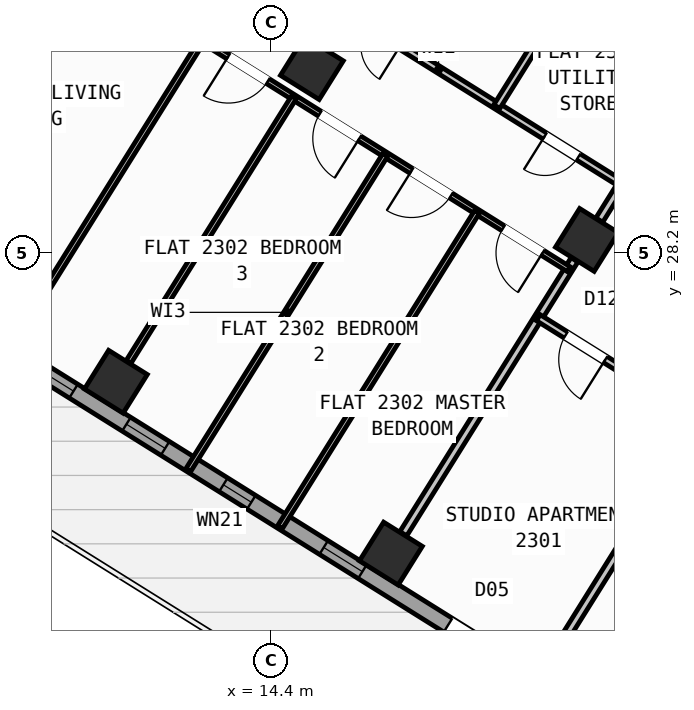
"""IFC4 building model, lengths in metres.
Left out: names, types, materials, properties, quantities, classifications, styles, units other than length and angle.
Written with IfcOpenShell. Run it as: python <this file> out.ifc"""

import sys

from ifc_helpers import new_model, si_unit, direction, frame, frame_2d, origin, origin_2d, place, context, subcontext, project, spatial, rectangle, hollow_rectangle, extrude, source, transform, mapped, element, fill, save


model = new_model("IFC4")
c1 = context("Model", 3, precision=1e-05, world=origin(), true_north=direction((0.0, 1.0)))
c2 = subcontext(c1, "Body", "Model", "MODEL_VIEW")
j1 = project(units=[si_unit("LENGTHUNIT", "METRE"), si_unit("PLANEANGLEUNIT", "RADIAN")], contexts=[c1])
p1 = place(None, origin())
s1 = spatial("IfcSite", under=j1, at=p1, CompositionType="ELEMENT")
p2 = place(p1, origin())
s2 = spatial("IfcBuilding", under=s1, at=p2, CompositionType="ELEMENT")
p3 = place(p2, frame((0.0, 0.0, 93.6)))
s3 = spatial("IfcBuildingStorey", under=s2, at=p3, CompositionType="ELEMENT", Elevation=93.6)
m1 = source(origin(), c2, "Body", "SweptSolid", [
    extrude(hollow_rectangle(XDim=0.9, YDim=0.9, WallThickness=0.036, at=origin_2d()), origin(), (0.0, 0.0, 1.0), 3.6),
])
for number, where, z_axis, x_axis in (
    (1, (20.632, 28.452, 0.0), (0.0, 0.0, 1.0), (-0.848, 0.53, 0.0)),
    (2, (16.764, 22.261, 0.0), (0.0, 0.0, 1.0), (-0.848, 0.53, 0.0)),
    (3, (15.205, 31.844, 0.0), (0.0, 0.0, 1.0), (-0.848, 0.53, 0.0)),
    (4, (11.336, 25.653, 0.0), (0.0, 0.0, 1.0), (-0.848, 0.53, 0.0)),
):
    element("IfcColumn", number, at=place(p3, frame(where, z_axis=z_axis, x_axis=x_axis)), inside=s3, PredefinedType="COLUMN", context=c2, shape_type="MappedRepresentation", body=[
        mapped(m1, transform((0.0, 0.0, 0.0), scale=1.0)),
    ])
p4 = place(p3, frame((31.76, 12.183, 0.0), z_axis=(0.0, 0.0, 1.0), x_axis=(-0.848047074256, 0.529920899612, 0.0)))
e5 = element("IfcWall", 5, at=p4, inside=s3, PredefinedType="STANDARD", context=c2, shape_type="SweptSolid", body=[
    extrude(rectangle(XDim=30.652, YDim=0.32, at=frame_2d((15.326, 0.0))), origin(), (0.0, 0.0, 1.0), 3.35),
])
p5 = place(p4, frame((15.153, 0.0, 0.0)))
e6 = element("IfcOpeningElement", 6, at=p5, cuts=e5, PredefinedType="OPENING", context=c2, shape_type="SweptSolid", body=[
    extrude(rectangle(XDim=1.2, YDim=2.15, at=frame_2d((0.6, 1.075))), frame((0.0, 0.17, 0.0), z_axis=(0.0, -1.0, 0.0), x_axis=(1.0, 0.0, 0.0)), (0.0, 0.0, 1.0), 0.34),
])
p6 = place(p4, frame((2.002, 0.0, 0.8)))
e7 = element("IfcOpeningElement", 7, at=p6, cuts=e5, PredefinedType="OPENING", context=c2, shape_type="SweptSolid", body=[
    extrude(rectangle(XDim=2.1, YDim=1.55, at=frame_2d((1.05, 0.775))), frame((0.0, 0.17, 0.0), z_axis=(0.0, -1.0, 0.0), x_axis=(1.0, 0.0, 0.0)), (0.0, 0.0, 1.0), 0.34),
])
p7 = place(p4, frame((7.206, 0.0, 0.8)))
e8 = element("IfcOpeningElement", 8, at=p7, cuts=e5, PredefinedType="OPENING", context=c2, shape_type="SweptSolid", body=[
    extrude(rectangle(XDim=2.1, YDim=1.55, at=frame_2d((1.05, 0.775))), frame((0.0, 0.17, 0.0), z_axis=(0.0, -1.0, 0.0), x_axis=(1.0, 0.0, 0.0)), (0.0, 0.0, 1.0), 0.34),
])
p8 = place(p4, frame((12.648, 0.0, 1.0)))
e9 = element("IfcOpeningElement", 9, at=p8, cuts=e5, PredefinedType="OPENING", context=c2, shape_type="SweptSolid", body=[
    extrude(rectangle(XDim=0.9, YDim=1.25, at=frame_2d((0.45, 0.625))), frame((0.0, 0.17, 0.0), z_axis=(0.0, -1.0, 0.0), x_axis=(1.0, 0.0, 0.0)), (0.0, 0.0, 1.0), 0.34),
])
p9 = place(p4, frame((27.974, 0.0, 0.95)))
e10 = element("IfcOpeningElement", 10, at=p9, cuts=e5, PredefinedType="OPENING", context=c2, shape_type="SweptSolid", body=[
    extrude(rectangle(XDim=1.2, YDim=1.4, at=frame_2d((0.6, 0.7))), frame((0.0, 0.17, 0.0), z_axis=(0.0, -1.0, 0.0), x_axis=(1.0, 0.0, 0.0)), (0.0, 0.0, 1.0), 0.34),
])
p10 = place(p4, frame((18.347, 0.0, 1.0)))
e11 = element("IfcOpeningElement", 11, at=p10, cuts=e5, PredefinedType="OPENING", context=c2, shape_type="SweptSolid", body=[
    extrude(rectangle(XDim=0.9, YDim=1.25, at=frame_2d((0.45, 0.625))), frame((0.0, 0.17, 0.0), z_axis=(0.0, -1.0, 0.0), x_axis=(1.0, 0.0, 0.0)), (0.0, 0.0, 1.0), 0.34),
])
p11 = place(p4, frame((20.931, 0.0, 1.0)))
e12 = element("IfcOpeningElement", 12, at=p11, cuts=e5, PredefinedType="OPENING", context=c2, shape_type="SweptSolid", body=[
    extrude(rectangle(XDim=0.65, YDim=1.15, at=frame_2d((0.325, 0.575))), frame((0.0, 0.17, 0.0), z_axis=(0.0, -1.0, 0.0), x_axis=(1.0, 0.0, 0.0)), (0.0, 0.0, 1.0), 0.34),
])
p12 = place(p4, frame((22.938, 0.0, 1.0)))
e13 = element("IfcOpeningElement", 13, at=p12, cuts=e5, PredefinedType="OPENING", context=c2, shape_type="SweptSolid", body=[
    extrude(rectangle(XDim=0.9, YDim=1.25, at=frame_2d((0.45, 0.625))), frame((0.0, 0.17, 0.0), z_axis=(0.0, -1.0, 0.0), x_axis=(1.0, 0.0, 0.0)), (0.0, 0.0, 1.0), 0.34),
])
p13 = place(p4, frame((25.069, 0.0, 1.0)))
e14 = element("IfcOpeningElement", 14, at=p13, cuts=e5, PredefinedType="OPENING", context=c2, shape_type="SweptSolid", body=[
    extrude(rectangle(XDim=0.9, YDim=1.25, at=frame_2d((0.45, 0.625))), frame((0.0, 0.17, 0.0), z_axis=(0.0, -1.0, 0.0), x_axis=(1.0, 0.0, 0.0)), (0.0, 0.0, 1.0), 0.34),
])
p14 = place(p3, frame((5.7, 28.71, 0.0), z_axis=(0.0, 0.0, 1.0), x_axis=(0.529923711467, 0.8480453172, 0.0)))
e15 = element("IfcWall", 15, at=p14, inside=s3, PredefinedType="STANDARD", context=c2, shape_type="SweptSolid", body=[
    extrude(rectangle(XDim=21.587, YDim=0.32, at=frame_2d((10.794, 0.0))), origin(), (0.0, 0.0, 1.0), 2.775),
])
p15 = place(p14, frame((2.994, 0.0, 0.8)))
e16 = element("IfcOpeningElement", 16, at=p15, cuts=e15, PredefinedType="OPENING", context=c2, shape_type="SweptSolid", body=[
    extrude(rectangle(XDim=2.1, YDim=1.55, at=frame_2d((1.05, 0.775))), frame((0.0, 0.17, 0.0), z_axis=(0.0, -1.0, 0.0), x_axis=(1.0, 0.0, 0.0)), (0.0, 0.0, 1.0), 0.34),
])
p16 = place(p14, frame((9.739, 0.0, 1.0)))
e17 = element("IfcOpeningElement", 17, at=p16, cuts=e15, PredefinedType="OPENING", context=c2, shape_type="SweptSolid", body=[
    extrude(rectangle(XDim=0.9, YDim=1.25, at=frame_2d((0.45, 0.625))), frame((0.0, 0.17, 0.0), z_axis=(0.0, -1.0, 0.0), x_axis=(1.0, 0.0, 0.0)), (0.0, 0.0, 1.0), 0.34),
])
p17 = place(p14, frame((18.639, 0.0, 0.85)))
e18 = element("IfcOpeningElement", 18, at=p17, cuts=e15, PredefinedType="OPENING", context=c2, shape_type="SweptSolid", body=[
    extrude(rectangle(XDim=1.5, YDim=1.5, at=frame_2d((0.75, 0.75))), frame((0.0, 0.17, 0.0), z_axis=(0.0, -1.0, 0.0), x_axis=(1.0, 0.0, 0.0)), (0.0, 0.0, 1.0), 0.34),
])
p18 = place(p3, frame((17.424, 47.083, 0.0), z_axis=(0.0, 0.0, 1.0), x_axis=(0.848049927979, -0.529916332693, 0.0)))
e19 = element("IfcWall", 19, at=p18, inside=s3, PredefinedType="STANDARD", context=c2, shape_type="SweptSolid", body=[
    extrude(rectangle(XDim=29.223, YDim=0.32, at=frame_2d((14.612, 0.0))), origin(), (0.0, 0.0, 1.0), 3.35),
])
p19 = place(p18, frame((3.745, 0.0, 0.0)))
e20 = element("IfcOpeningElement", 20, at=p19, cuts=e19, PredefinedType="OPENING", context=c2, shape_type="SweptSolid", body=[
    extrude(rectangle(XDim=1.05, YDim=2.15, at=frame_2d((0.525, 1.075))), frame((0.0, 0.17, 0.0), z_axis=(0.0, -1.0, 0.0), x_axis=(1.0, 0.0, 0.0)), (0.0, 0.0, 1.0), 0.34),
])
p20 = place(p18, frame((0.699, 0.0, 0.95)))
e21 = element("IfcOpeningElement", 21, at=p20, cuts=e19, PredefinedType="OPENING", context=c2, shape_type="SweptSolid", body=[
    extrude(rectangle(XDim=1.2, YDim=1.4, at=frame_2d((0.6, 0.7))), frame((0.0, 0.17, 0.0), z_axis=(0.0, -1.0, 0.0), x_axis=(1.0, 0.0, 0.0)), (0.0, 0.0, 1.0), 0.34),
])
p21 = place(p18, frame((6.951, 0.0, 1.0)))
e22 = element("IfcOpeningElement", 22, at=p21, cuts=e19, PredefinedType="OPENING", context=c2, shape_type="SweptSolid", body=[
    extrude(rectangle(XDim=0.9, YDim=1.25, at=frame_2d((0.45, 0.625))), frame((0.0, 0.17, 0.0), z_axis=(0.0, -1.0, 0.0), x_axis=(1.0, 0.0, 0.0)), (0.0, 0.0, 1.0), 0.34),
])
p22 = place(p18, frame((9.841, 0.0, 0.85)))
e23 = element("IfcOpeningElement", 23, at=p22, cuts=e19, PredefinedType="OPENING", context=c2, shape_type="SweptSolid", body=[
    extrude(rectangle(XDim=1.5, YDim=1.5, at=frame_2d((0.75, 0.75))), frame((0.0, 0.17, 0.0), z_axis=(0.0, -1.0, 0.0), x_axis=(1.0, 0.0, 0.0)), (0.0, 0.0, 1.0), 0.34),
])
p23 = place(p18, frame((13.889, 0.0, 0.95)))
e24 = element("IfcOpeningElement", 24, at=p23, cuts=e19, PredefinedType="OPENING", context=c2, shape_type="SweptSolid", body=[
    extrude(rectangle(XDim=1.2, YDim=1.4, at=frame_2d((0.6, 0.7))), frame((0.0, 0.17, 0.0), z_axis=(0.0, -1.0, 0.0), x_axis=(1.0, 0.0, 0.0)), (0.0, 0.0, 1.0), 0.34),
])
p24 = place(p18, frame((17.254, 0.0, 1.0)))
e25 = element("IfcOpeningElement", 25, at=p24, cuts=e19, PredefinedType="OPENING", context=c2, shape_type="SweptSolid", body=[
    extrude(rectangle(XDim=0.9, YDim=1.25, at=frame_2d((0.45, 0.625))), frame((0.0, 0.17, 0.0), z_axis=(0.0, -1.0, 0.0), x_axis=(1.0, 0.0, 0.0)), (0.0, 0.0, 1.0), 0.34),
])
p25 = place(p18, frame((20.764, 0.0, 0.8)))
e26 = element("IfcOpeningElement", 26, at=p25, cuts=e19, PredefinedType="OPENING", context=c2, shape_type="SweptSolid", body=[
    extrude(rectangle(XDim=2.1, YDim=1.55, at=frame_2d((1.05, 0.775))), frame((0.0, 0.17, 0.0), z_axis=(0.0, -1.0, 0.0), x_axis=(1.0, 0.0, 0.0)), (0.0, 0.0, 1.0), 0.34),
])
p26 = place(p18, frame((25.403, 0.0, 0.8)))
e27 = element("IfcOpeningElement", 27, at=p26, cuts=e19, PredefinedType="OPENING", context=c2, shape_type="SweptSolid", body=[
    extrude(rectangle(XDim=2.1, YDim=1.55, at=frame_2d((1.05, 0.775))), frame((0.0, 0.17, 0.0), z_axis=(0.0, -1.0, 0.0), x_axis=(1.0, 0.0, 0.0)), (0.0, 0.0, 1.0), 0.34),
])
p27 = place(p3, frame((25.807, 29.582, 0.0), z_axis=(0.0, 0.0, 1.0), x_axis=(-0.529920357077, -0.848047413271, 0.0)))
e28 = element("IfcWall", 28, at=p27, inside=s3, PredefinedType="PARTITIONING", context=c2, shape_type="SweptSolid", body=[
    extrude(rectangle(XDim=11.45, YDim=0.16, at=frame_2d((5.725, 0.0))), origin(), (0.0, 0.0, 1.0), 3.34),
])
p28 = place(p3, frame((26.973, 31.447, 0.0), z_axis=(0.0, 0.0, 1.0), x_axis=(-0.848048310262, 0.529918921593, 0.0)))
e29 = element("IfcWall", 29, at=p28, inside=s3, PredefinedType="PARTITIONING", context=c2, shape_type="SweptSolid", body=[
    extrude(rectangle(XDim=16.73, YDim=0.16, at=frame_2d((8.365, 0.0))), origin(), (0.0, 0.0, 1.0), 3.34),
])
p29 = place(p28, frame((2.22, 0.0, 0.0)))
e30 = element("IfcOpeningElement", 30, at=p29, cuts=e29, PredefinedType="OPENING", context=c2, shape_type="SweptSolid", body=[
    extrude(rectangle(XDim=0.86, YDim=2.05, at=frame_2d((0.43, 1.025))), frame((0.0, 0.09, 0.0), z_axis=(0.0, -1.0, 0.0), x_axis=(1.0, 0.0, 0.0)), (0.0, 0.0, 1.0), 0.18),
])
p30 = place(p28, frame((5.28, 0.0, 0.0)))
e31 = element("IfcOpeningElement", 31, at=p30, cuts=e29, PredefinedType="OPENING", context=c2, shape_type="SweptSolid", body=[
    extrude(rectangle(XDim=1.0, YDim=2.1, at=frame_2d((0.5, 1.05))), frame((0.0, 0.09, 0.0), z_axis=(0.0, -1.0, 0.0), x_axis=(1.0, 0.0, 0.0)), (0.0, 0.0, 1.0), 0.18),
])
p31 = place(p3, frame((25.807, 29.582, 0.0), z_axis=(0.0, 0.0, 1.0), x_axis=(-0.848052408131, 0.529912363569, 0.0)))
e32 = element("IfcWall", 32, at=p31, inside=s3, PredefinedType="PARTITIONING", context=c2, shape_type="SweptSolid", body=[
    extrude(rectangle(XDim=16.73, YDim=0.16, at=frame_2d((8.365, 0.0))), origin(), (0.0, 0.0, 1.0), 3.34),
])
p32 = place(p31, frame((2.22, 0.0, 0.0)))
e33 = element("IfcOpeningElement", 33, at=p32, cuts=e32, PredefinedType="OPENING", context=c2, shape_type="SweptSolid", body=[
    extrude(rectangle(XDim=0.86, YDim=2.05, at=frame_2d((0.43, 1.025))), frame((0.0, 0.09, 0.0), z_axis=(0.0, -1.0, 0.0), x_axis=(1.0, 0.0, 0.0)), (0.0, 0.0, 1.0), 0.18),
])
p33 = place(p31, frame((14.013, 0.0, 0.0)))
e34 = element("IfcOpeningElement", 34, at=p33, cuts=e32, PredefinedType="OPENING", context=c2, shape_type="SweptSolid", body=[
    extrude(rectangle(XDim=1.0, YDim=2.1, at=frame_2d((0.5, 1.05))), frame((0.0, 0.09, 0.0), z_axis=(0.0, -1.0, 0.0), x_axis=(1.0, 0.0, 0.0)), (0.0, 0.0, 1.0), 0.18),
])
p34 = place(p3, frame((22.593, 31.59, 0.0), z_axis=(0.0, 0.0, 1.0), x_axis=(-0.529924383291, -0.848044897393, 0.0)))
e35 = element("IfcWall", 35, at=p34, inside=s3, PredefinedType="PARTITIONING", context=c2, shape_type="SweptSolid", body=[
    extrude(rectangle(XDim=3.238, YDim=0.16, at=frame_2d((1.619, 0.0))), origin(), (0.0, 0.0, 1.0), 2.775),
])
p35 = place(p3, frame((20.387, 28.06, 0.0), z_axis=(0.0, 0.0, 1.0), x_axis=(-0.529902564924, -0.848058530814, 0.0)))
e36 = element("IfcWall", 36, at=p35, inside=s3, PredefinedType="PARTITIONING", context=c2, shape_type="SweptSolid", body=[
    extrude(rectangle(XDim=6.376, YDim=0.16, at=frame_2d((3.188, 0.0))), origin(), (0.0, 0.0, 1.0), 2.775),
])
p36 = place(p3, frame((22.887, 24.909, 0.0), z_axis=(0.0, 0.0, 1.0), x_axis=(-0.84803087207, 0.529946827537, 0.0)))
e37 = element("IfcWall", 37, at=p36, inside=s3, PredefinedType="PLUMBINGWALL", context=c2, shape_type="SweptSolid", body=[
    extrude(rectangle(XDim=3.79, YDim=0.14, at=frame_2d((1.895, 0.0))), origin(), (0.0, 0.0, 1.0), 3.34),
])
p37 = place(p36, frame((2.23, 0.0, 0.0)))
e38 = element("IfcOpeningElement", 38, at=p37, cuts=e37, PredefinedType="OPENING", context=c2, shape_type="SweptSolid", body=[
    extrude(rectangle(XDim=0.92, YDim=2.08, at=frame_2d((0.46, 1.04))), frame((0.0, 0.08, 0.0), z_axis=(0.0, -1.0, 0.0), x_axis=(1.0, 0.0, 0.0)), (0.0, 0.0, 1.0), 0.16),
])
p38 = place(p3, frame((15.361, 36.108, 0.0), z_axis=(0.0, 0.0, 1.0), x_axis=(-0.529912802348, -0.848052133956, 0.0)))
e39 = element("IfcWall", 39, at=p38, inside=s3, PredefinedType="PARTITIONING", context=c2, shape_type="SweptSolid", body=[
    extrude(rectangle(XDim=11.72, YDim=0.11, at=frame_2d((5.86, 0.0))), origin(), (0.0, 0.0, 1.0), 2.995),
])
p39 = place(p38, frame((3.0, 0.0, 0.0)))
e40 = element("IfcOpeningElement", 40, at=p39, cuts=e39, PredefinedType="OPENING", context=c2, shape_type="SweptSolid", body=[
    extrude(rectangle(XDim=0.78, YDim=2.05, at=frame_2d((0.39, 1.025))), frame((0.0, 0.065, 0.0), z_axis=(0.0, -1.0, 0.0), x_axis=(1.0, 0.0, 0.0)), (0.0, 0.0, 1.0), 0.13),
])
p40 = place(p3, frame((21.321, 29.554, 0.0), z_axis=(0.0, 0.0, 1.0), x_axis=(-0.84803529765, 0.529939745575, 0.0)))
e41 = element("IfcWall", 41, at=p40, inside=s3, PredefinedType="PLUMBINGWALL", context=c2, shape_type="SweptSolid", body=[
    extrude(rectangle(XDim=8.527, YDim=0.14, at=frame_2d((4.264, 0.0))), origin(), (0.0, 0.0, 1.0), 3.34),
])
p41 = place(p40, frame((5.155, 0.0, 0.0)))
e42 = element("IfcOpeningElement", 42, at=p41, cuts=e41, PredefinedType="OPENING", context=c2, shape_type="SweptSolid", body=[
    extrude(rectangle(XDim=0.78, YDim=2.05, at=frame_2d((0.39, 1.025))), frame((0.0, 0.08, 0.0), z_axis=(0.0, -1.0, 0.0), x_axis=(1.0, 0.0, 0.0)), (0.0, 0.0, 1.0), 0.16),
])
p42 = place(p40, frame((1.011, 0.0, 0.0)))
e43 = element("IfcOpeningElement", 43, at=p42, cuts=e41, PredefinedType="OPENING", context=c2, shape_type="SweptSolid", body=[
    extrude(rectangle(XDim=0.78, YDim=2.05, at=frame_2d((0.39, 1.025))), frame((0.0, 0.08, 0.0), z_axis=(0.0, -1.0, 0.0), x_axis=(1.0, 0.0, 0.0)), (0.0, 0.0, 1.0), 0.16),
])
p43 = place(p3, frame((20.132, 33.128, 0.0), z_axis=(0.0, 0.0, 1.0), x_axis=(-0.529935194983, -0.848038141311, 0.0)))
e44 = element("IfcWall", 44, at=p43, inside=s3, PredefinedType="PLUMBINGWALL", context=c2, shape_type="SweptSolid", body=[
    extrude(rectangle(XDim=2.41, YDim=0.14, at=frame_2d((1.205, 0.0))), origin(), (0.0, 0.0, 1.0), 3.34),
])
p44 = place(p3, frame((20.272, 27.875, 0.0), z_axis=(0.0, 0.0, 1.0), x_axis=(-0.848056204746, 0.529906287557, 0.0)))
e45 = element("IfcWall", 45, at=p44, inside=s3, PredefinedType="PARTITIONING", context=c2, shape_type="SweptSolid", body=[
    extrude(rectangle(XDim=8.527, YDim=0.11, at=frame_2d((4.264, 0.0))), origin(), (0.0, 0.0, 1.0), 3.34),
])
p45 = place(p44, frame((0.606, 0.0, 0.0)))
e46 = element("IfcOpeningElement", 46, at=p45, cuts=e45, PredefinedType="OPENING", context=c2, shape_type="SweptSolid", body=[
    extrude(rectangle(XDim=0.92, YDim=2.08, at=frame_2d((0.46, 1.04))), frame((0.0, 0.065, 0.0), z_axis=(0.0, -1.0, 0.0), x_axis=(1.0, 0.0, 0.0)), (0.0, 0.0, 1.0), 0.13),
])
p46 = place(p44, frame((2.738, 0.0, 0.0)))
e47 = element("IfcOpeningElement", 47, at=p46, cuts=e45, PredefinedType="OPENING", context=c2, shape_type="SweptSolid", body=[
    extrude(rectangle(XDim=0.92, YDim=2.08, at=frame_2d((0.46, 1.04))), frame((0.0, 0.065, 0.0), z_axis=(0.0, -1.0, 0.0), x_axis=(1.0, 0.0, 0.0)), (0.0, 0.0, 1.0), 0.13),
])
p47 = place(p44, frame((4.869, 0.0, 0.0)))
e48 = element("IfcOpeningElement", 48, at=p47, cuts=e45, PredefinedType="OPENING", context=c2, shape_type="SweptSolid", body=[
    extrude(rectangle(XDim=0.92, YDim=2.08, at=frame_2d((0.46, 1.04))), frame((0.0, 0.065, 0.0), z_axis=(0.0, -1.0, 0.0), x_axis=(1.0, 0.0, 0.0)), (0.0, 0.0, 1.0), 0.13),
])
p48 = place(p44, frame((7.001, 0.0, 0.0)))
e49 = element("IfcOpeningElement", 49, at=p48, cuts=e45, PredefinedType="OPENING", context=c2, shape_type="SweptSolid", body=[
    extrude(rectangle(XDim=0.92, YDim=2.08, at=frame_2d((0.46, 1.04))), frame((0.0, 0.065, 0.0), z_axis=(0.0, -1.0, 0.0), x_axis=(1.0, 0.0, 0.0)), (0.0, 0.0, 1.0), 0.13),
])
for number, where, z_axis, x_axis in (
    (50, (18.464, 29.005, 0.0), (0.0, 0.0, 1.0), (-0.53, -0.848, 0.0)),
    (51, (16.656, 30.135, 0.0), (0.0, 0.0, 1.0), (-0.53, -0.848, 0.0)),
):
    element("IfcWall", number, at=place(p3, frame(where, z_axis=z_axis, x_axis=x_axis)), inside=s3, PredefinedType="PARTITIONING", context=c2, shape_type="SweptSolid", body=[
        extrude(rectangle(XDim=7.34, YDim=0.11, at=frame_2d((3.67, 0.0))), origin(), (0.0, 0.0, 1.0), 2.995),
    ])
p49 = place(p3, frame((14.848, 31.264, 0.0), z_axis=(0.0, 0.0, 1.0), x_axis=(-0.529920534869, -0.848047302174, 0.0)))
e52 = element("IfcWall", 52, at=p49, inside=s3, PredefinedType="PARTITIONING", context=c2, shape_type="SweptSolid", body=[
    extrude(rectangle(XDim=6.158, YDim=0.11, at=frame_2d((3.079, 0.0))), origin(), (0.0, 0.0, 1.0), 2.775),
])
m2 = source(origin(), c2, "Body", "SweptSolid", [
    extrude(rectangle(XDim=1.2, YDim=2.15, at=frame_2d((0.6, 1.075))), frame((0.0, 0.025, 0.0), z_axis=(0.0, -1.0, 0.0), x_axis=(1.0, 0.0, 0.0)), (0.0, 0.0, 1.0), 0.05),
])
p50 = place(p5, origin())
e53 = element("IfcDoor", 53, at=p50, inside=s3, OperationType="SINGLE_SWING_LEFT", PredefinedType="DOOR", context=c2, shape_type="MappedRepresentation", body=[
    mapped(m2, transform((0.0, 0.0, 0.0), scale=1.0)),
])
fill(e6, e53)
m3 = source(origin(), c2, "Body", "SweptSolid", [
    extrude(rectangle(XDim=0.9, YDim=1.25, at=frame_2d((0.45, 0.625))), frame((0.0, 0.03, 0.0), z_axis=(0.0, -1.0, 0.0), x_axis=(1.0, 0.0, 0.0)), (0.0, 0.0, 1.0), 0.06),
])
p51 = place(p10, origin())
e54 = element("IfcWindow", 54, at=p51, inside=s3, PartitioningType="SINGLE_PANEL", PredefinedType="WINDOW", context=c2, shape_type="MappedRepresentation", body=[
    mapped(m3, transform((0.0, 0.0, 0.0), scale=1.0)),
])
fill(e11, e54)
m4 = source(origin(), c2, "Body", "SweptSolid", [
    extrude(rectangle(XDim=0.65, YDim=1.15, at=frame_2d((0.325, 0.575))), frame((0.0, 0.03, 0.0), z_axis=(0.0, -1.0, 0.0), x_axis=(1.0, 0.0, 0.0)), (0.0, 0.0, 1.0), 0.06),
])
p52 = place(p11, origin())
e55 = element("IfcWindow", 55, at=p52, inside=s3, PartitioningType="SINGLE_PANEL", PredefinedType="WINDOW", context=c2, shape_type="MappedRepresentation", body=[
    mapped(m4, transform((0.0, 0.0, 0.0), scale=1.0)),
])
fill(e12, e55)
p53 = place(p12, origin())
e56 = element("IfcWindow", 56, at=p53, inside=s3, PartitioningType="SINGLE_PANEL", PredefinedType="WINDOW", context=c2, shape_type="MappedRepresentation", body=[
    mapped(m3, transform((0.0, 0.0, 0.0), scale=1.0)),
])
fill(e13, e56)
p54 = place(p13, origin())
e57 = element("IfcWindow", 57, at=p54, inside=s3, PartitioningType="SINGLE_PANEL", PredefinedType="WINDOW", context=c2, shape_type="MappedRepresentation", body=[
    mapped(m3, transform((0.0, 0.0, 0.0), scale=1.0)),
])
fill(e14, e57)
m5 = source(origin(), c2, "Body", "SweptSolid", [
    extrude(rectangle(XDim=0.92, YDim=2.08, at=frame_2d((0.46, 1.04))), frame((0.0, 0.025, 0.0), z_axis=(0.0, -1.0, 0.0), x_axis=(1.0, 0.0, 0.0)), (0.0, 0.0, 1.0), 0.05),
])
p55 = place(p37, origin())
e58 = element("IfcDoor", 58, at=p55, inside=s3, OperationType="SINGLE_SWING_LEFT", PredefinedType="DOOR", context=c2, shape_type="MappedRepresentation", body=[
    mapped(m5, transform((0.0, 0.0, 0.0), scale=1.0)),
])
fill(e38, e58)
m6 = source(origin(), c2, "Body", "SweptSolid", [
    extrude(rectangle(XDim=0.78, YDim=2.05, at=frame_2d((0.39, 1.025))), frame((0.0, 0.025, 0.0), z_axis=(0.0, -1.0, 0.0), x_axis=(1.0, 0.0, 0.0)), (0.0, 0.0, 1.0), 0.05),
])
p56 = place(p42, origin())
e59 = element("IfcDoor", 59, at=p56, inside=s3, OperationType="SINGLE_SWING_RIGHT", PredefinedType="DOOR", context=c2, shape_type="MappedRepresentation", body=[
    mapped(m6, transform((0.0, 0.0, 0.0), scale=1.0)),
])
fill(e43, e59)
p57 = place(p45, origin())
e60 = element("IfcDoor", 60, at=p57, inside=s3, OperationType="SINGLE_SWING_LEFT", PredefinedType="DOOR", context=c2, shape_type="MappedRepresentation", body=[
    mapped(m5, transform((0.0, 0.0, 0.0), scale=1.0)),
])
fill(e46, e60)
p58 = place(p46, origin())
e61 = element("IfcDoor", 61, at=p58, inside=s3, OperationType="SINGLE_SWING_RIGHT", PredefinedType="DOOR", context=c2, shape_type="MappedRepresentation", body=[
    mapped(m5, transform((0.0, 0.0, 0.0), scale=1.0)),
])
fill(e47, e61)
p59 = place(p47, origin())
e62 = element("IfcDoor", 62, at=p59, inside=s3, OperationType="SINGLE_SWING_LEFT", PredefinedType="DOOR", context=c2, shape_type="MappedRepresentation", body=[
    mapped(m5, transform((0.0, 0.0, 0.0), scale=1.0)),
])
fill(e48, e62)
p60 = place(p48, origin())
e63 = element("IfcDoor", 63, at=p60, inside=s3, OperationType="SINGLE_SWING_RIGHT", PredefinedType="DOOR", context=c2, shape_type="MappedRepresentation", body=[
    mapped(m5, transform((0.0, 0.0, 0.0), scale=1.0)),
])
fill(e49, e63)
save(model, sys.argv[1])
